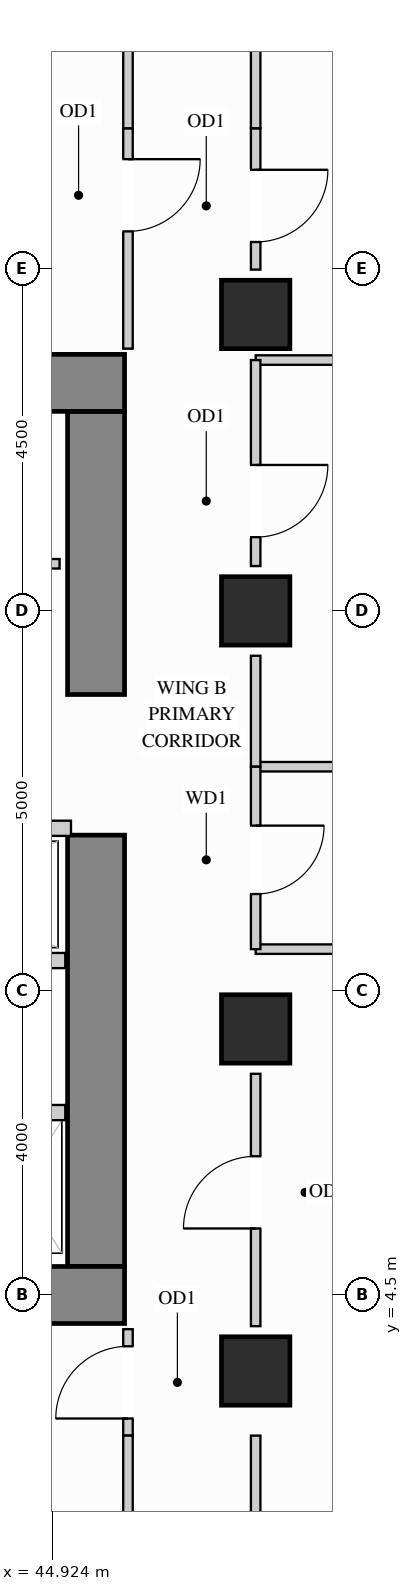
"""IFC4 building model, lengths in metres.
Left out: names, types, materials, properties, quantities, classifications, styles, units other than length and angle.
Written with IfcOpenShell. Run it as: python <this file> out.ifc"""

import sys

from ifc_helpers import new_model, si_unit, direction, frame, frame_2d, origin, origin_2d, place, context, subcontext, project, spatial, rectangle, extrude, source, transform, mapped, element, fill, save


model = new_model("IFC4")
c1 = context("Model", 3, precision=1e-05, world=origin(), true_north=direction((0.0, 1.0)))
c2 = subcontext(c1, "Body", "Model", "MODEL_VIEW")
j1 = project(units=[si_unit("LENGTHUNIT", "METRE"), si_unit("PLANEANGLEUNIT", "RADIAN")], contexts=[c1])
p1 = place(None, origin())
s1 = spatial("IfcSite", under=j1, at=p1, CompositionType="ELEMENT")
p2 = place(p1, origin())
s2 = spatial("IfcBuilding", under=s1, at=p2, CompositionType="ELEMENT")
p3 = place(p2, frame((0.0, 0.0, 99.0)))
s3 = spatial("IfcBuildingStorey", under=s2, at=p3, CompositionType="ELEMENT", Elevation=99.0)
m1 = source(origin(), c2, "Body", "SweptSolid", [
    extrude(rectangle(XDim=0.9, YDim=0.9, at=origin_2d()), origin(), (0.0, 0.0, 1.0), 3.38),
])
for number, where, z_axis, x_axis in (
    (1, (47.6, 13.5, 0.0), (0.0, 0.0, 1.0), (1.0, 0.0, 0.0)),
    (2, (47.6, 3.5, 0.0), (0.0, 0.0, 1.0), (1.0, 0.0, 0.0)),
    (3, (47.6, 8.0, 0.0), (0.0, 0.0, 1.0), (1.0, 0.0, 0.0)),
    (4, (47.6, 17.4, 0.0), (0.0, 0.0, 1.0), (1.0, 0.0, 0.0)),
):
    element("IfcColumn", number, at=place(p3, frame(where, z_axis=z_axis, x_axis=x_axis)), inside=s3, PredefinedType="COLUMN", context=c2, shape_type="MappedRepresentation", body=[
        mapped(m1, transform((0.0, 0.0, 0.0), x_axis=(1.0, 0.0, 0.0), y_axis=(0.0, 1.0, 0.0), z_axis=(0.0, 0.0, 1.0))),
    ])
m2 = source(origin(), c2, "Body", "SweptSolid", [
    extrude(rectangle(XDim=5.675, YDim=0.75, at=frame_2d((2.837, 0.0))), origin(), (0.0, 0.0, 1.0), 3.38),
])
p4 = place(p3, frame((45.5, 4.875, 0.0), z_axis=(0.0, 0.0, 1.0), x_axis=(0.0, 1.0, 0.0)))
e5 = element("IfcWall", 5, at=p4, inside=s3, PredefinedType="SHEAR", context=c2, shape_type="MappedRepresentation", body=[
    mapped(m2, transform((0.0, 0.0, 0.0), x_axis=(1.0, 0.0, 0.0), y_axis=(0.0, 1.0, 0.0), z_axis=(0.0, 0.0, 1.0))),
])
m3 = source(origin(), c2, "Body", "SweptSolid", [
    extrude(rectangle(XDim=3.725, YDim=0.75, at=frame_2d((1.863, 0.0))), origin(), (0.0, 0.0, 1.0), 3.38),
])
p5 = place(p3, frame((45.5, 12.4, 0.0), z_axis=(0.0, 0.0, 1.0), x_axis=(0.0, 1.0, 0.0)))
e6 = element("IfcWall", 6, at=p5, inside=s3, PredefinedType="SHEAR", context=c2, shape_type="MappedRepresentation", body=[
    mapped(m3, transform((0.0, 0.0, 0.0), x_axis=(1.0, 0.0, 0.0), y_axis=(0.0, 1.0, 0.0), z_axis=(0.0, 0.0, 1.0))),
])
m4 = source(origin(), c2, "Body", "SweptSolid", [
    extrude(rectangle(XDim=10.25, YDim=0.75, at=frame_2d((5.125, 0.0))), origin(), (0.0, 0.0, 1.0), 3.38),
])
for number, where, z_axis, x_axis in (
    (7, (35.625, 16.5, 0.0), (0.0, 0.0, 1.0), (1.0, 0.0, 0.0)),
    (8, (35.625, 4.5, 0.0), (0.0, 0.0, 1.0), (1.0, 0.0, 0.0)),
):
    element("IfcWall", number, at=place(p3, frame(where, z_axis=z_axis, x_axis=x_axis)), inside=s3, PredefinedType="SHEAR", context=c2, shape_type="MappedRepresentation", body=[
        mapped(m4, transform((0.0, 0.0, 0.0), x_axis=(1.0, 0.0, 0.0), y_axis=(0.0, 1.0, 0.0), z_axis=(0.0, 0.0, 1.0))),
    ])
p6 = place(p3, frame((41.8, 14.12, 0.0), z_axis=(0.0, 0.0, 1.0), x_axis=(1.0, 0.0, 0.0)))
e9 = element("IfcWall", 9, at=p6, inside=s3, PredefinedType="PARTITIONING", context=c2, shape_type="SweptSolid", body=[
    extrude(rectangle(XDim=3.22, YDim=0.125, at=frame_2d((1.61, 0.0))), origin(), (0.0, 0.0, 1.0), 3.365),
])
p7 = place(p6, frame((1.135, 0.0, 0.0)))
e10 = element("IfcOpeningElement", 10, at=p7, cuts=e9, PredefinedType="OPENING", context=c2, shape_type="SweptSolid", body=[
    extrude(rectangle(XDim=0.85, YDim=2.1, at=frame_2d((0.425, 1.05))), frame((0.0, 0.073, 0.0), z_axis=(0.0, -1.0, 0.0), x_axis=(1.0, 0.0, 0.0)), (0.0, 0.0, 1.0), 0.145),
])
m5 = source(origin(), c2, "Body", "SweptSolid", [
    extrude(rectangle(XDim=8.048, YDim=0.125, at=frame_2d((4.024, 0.0))), origin(), (0.0, 0.0, 1.0), 3.365),
])
for number, where, z_axis, x_axis in (
    (11, (47.6, 11.45, 0.0), (0.0, 0.0, 1.0), (1.0, 0.0, 0.0)),
    (12, (47.6, 16.8, 0.0), (0.0, 0.0, 1.0), (1.0, 0.0, 0.0)),
    (13, (47.6, 9.05, 0.0), (0.0, 0.0, 1.0), (1.0, 0.0, 0.0)),
):
    element("IfcWall", number, at=place(p3, frame(where, z_axis=z_axis, x_axis=x_axis)), inside=s3, PredefinedType="PARTITIONING", context=c2, shape_type="MappedRepresentation", body=[
        mapped(m5, transform((0.0, 0.0, 0.0), x_axis=(1.0, 0.0, 0.0), y_axis=(0.0, 1.0, 0.0), z_axis=(0.0, 0.0, 1.0))),
    ])
p8 = place(p3, frame((47.6, 4.09, 0.0), z_axis=(0.0, 0.0, 1.0), x_axis=(0.0, 1.0, 0.0)))
e14 = element("IfcWall", 14, at=p8, inside=s3, PredefinedType="PARTITIONING", context=c2, shape_type="SweptSolid", body=[
    extrude(rectangle(XDim=3.32, YDim=0.125, at=frame_2d((1.66, 0.0))), origin(), (0.0, 0.0, 1.0), 2.677),
])
p9 = place(p8, frame((1.285, 0.0, 0.0)))
e15 = element("IfcOpeningElement", 15, at=p9, cuts=e14, PredefinedType="OPENING", context=c2, shape_type="SweptSolid", body=[
    extrude(rectangle(XDim=0.95, YDim=2.15, at=frame_2d((0.475, 1.075))), frame((0.0, 0.073, 0.0), z_axis=(0.0, -1.0, 0.0), x_axis=(1.0, 0.0, 0.0)), (0.0, 0.0, 1.0), 0.145),
])
m6 = source(origin(), c2, "Body", "SweptSolid", [
    extrude(rectangle(XDim=1.46, YDim=0.125, at=frame_2d((0.73, 0.0))), origin(), (0.0, 0.0, 1.0), 2.677),
])
for number, where, z_axis, x_axis in (
    (16, (47.6, 1.19, 0.0), (0.0, 0.0, 1.0), (0.0, 1.0, 0.0)),
    (17, (47.6, 11.45, 0.0), (0.0, 0.0, 1.0), (0.0, 1.0, 0.0)),
):
    element("IfcWall", number, at=place(p3, frame(where, z_axis=z_axis, x_axis=x_axis)), inside=s3, PredefinedType="PARTITIONING", context=c2, shape_type="MappedRepresentation", body=[
        mapped(m6, transform((0.0, 0.0, 0.0), x_axis=(1.0, 0.0, 0.0), y_axis=(0.0, 1.0, 0.0), z_axis=(0.0, 0.0, 1.0))),
    ])
p10 = place(p3, frame((47.6, 14.09, 0.0), z_axis=(0.0, 0.0, 1.0), x_axis=(0.0, 1.0, 0.0)))
e18 = element("IfcWall", 18, at=p10, inside=s3, PredefinedType="PARTITIONING", context=c2, shape_type="SweptSolid", body=[
    extrude(rectangle(XDim=2.71, YDim=0.125, at=frame_2d((1.355, 0.0))), origin(), (0.0, 0.0, 1.0), 2.677),
])
p11 = place(p10, frame((0.38, 0.0, 0.0)))
e19 = element("IfcOpeningElement", 19, at=p11, cuts=e18, PredefinedType="OPENING", context=c2, shape_type="SweptSolid", body=[
    extrude(rectangle(XDim=0.95, YDim=2.15, at=frame_2d((0.475, 1.075))), frame((0.0, 0.073, 0.0), z_axis=(0.0, -1.0, 0.0), x_axis=(1.0, 0.0, 0.0)), (0.0, 0.0, 1.0), 0.145),
])
p12 = place(p3, frame((47.6, 17.99, 0.0), z_axis=(0.0, 0.0, 1.0), x_axis=(0.0, 1.0, 0.0)))
e20 = element("IfcWall", 20, at=p12, inside=s3, PredefinedType="PARTITIONING", context=c2, shape_type="SweptSolid", body=[
    extrude(rectangle(XDim=1.86, YDim=0.125, at=frame_2d((0.93, 0.0))), origin(), (0.0, 0.0, 1.0), 2.677),
])
p13 = place(p12, frame((0.363, 0.0, 0.0)))
e21 = element("IfcOpeningElement", 21, at=p13, cuts=e20, PredefinedType="OPENING", context=c2, shape_type="SweptSolid", body=[
    extrude(rectangle(XDim=0.95, YDim=2.15, at=frame_2d((0.475, 1.075))), frame((0.0, 0.073, 0.0), z_axis=(0.0, -1.0, 0.0), x_axis=(1.0, 0.0, 0.0)), (0.0, 0.0, 1.0), 0.145),
])
p14 = place(p3, frame((47.6, 19.85, 0.0), z_axis=(0.0, 0.0, 1.0), x_axis=(0.0, 1.0, 0.0)))
e22 = element("IfcWall", 22, at=p14, inside=s3, PredefinedType="PARTITIONING", context=c2, shape_type="MappedRepresentation", body=[
    mapped(m6, transform((0.0, 0.0, 0.0), x_axis=(1.0, 0.0, 0.0), y_axis=(0.0, 1.0, 0.0), z_axis=(0.0, 0.0, 1.0))),
])
p15 = place(p3, frame((47.6, 9.05, 0.0), z_axis=(0.0, 0.0, 1.0), x_axis=(0.0, 1.0, 0.0)))
e23 = element("IfcWall", 23, at=p15, inside=s3, PredefinedType="PARTITIONING", context=c2, shape_type="SweptSolid", body=[
    extrude(rectangle(XDim=2.4, YDim=0.125, at=frame_2d((1.2, 0.0))), origin(), (0.0, 0.0, 1.0), 2.677),
])
p16 = place(p15, frame((0.725, 0.0, 0.0)))
e24 = element("IfcOpeningElement", 24, at=p16, cuts=e23, PredefinedType="OPENING", context=c2, shape_type="SweptSolid", body=[
    extrude(rectangle(XDim=0.9, YDim=2.15, at=frame_2d((0.45, 1.075))), frame((0.0, 0.073, 0.0), z_axis=(0.0, -1.0, 0.0), x_axis=(1.0, 0.0, 0.0)), (0.0, 0.0, 1.0), 0.145),
])
p17 = place(p3, frame((45.92, 16.95, 0.0), z_axis=(0.0, 0.0, 1.0), x_axis=(0.0, 1.0, 0.0)))
e25 = element("IfcWall", 25, at=p17, inside=s3, PredefinedType="PARTITIONING", context=c2, shape_type="SweptSolid", body=[
    extrude(rectangle(XDim=2.9, YDim=0.125, at=frame_2d((1.45, 0.0))), origin(), (0.0, 0.0, 1.0), 3.365),
])
p18 = place(p17, frame((1.543, 0.0, 0.0)))
e26 = element("IfcOpeningElement", 26, at=p18, cuts=e25, PredefinedType="OPENING", context=c2, shape_type="SweptSolid", body=[
    extrude(rectangle(XDim=0.95, YDim=2.15, at=frame_2d((0.475, 1.075))), frame((0.0, 0.073, 0.0), z_axis=(0.0, -1.0, 0.0), x_axis=(1.0, 0.0, 0.0)), (0.0, 0.0, 1.0), 0.145),
])
m7 = source(origin(), c2, "Body", "SweptSolid", [
    extrude(rectangle(XDim=2.298, YDim=0.125, at=frame_2d((1.149, 0.0))), origin(), (0.0, 0.0, 1.0), 3.365),
])
p19 = place(p3, frame((45.92, 19.85, 0.0), z_axis=(0.0, 0.0, 1.0), x_axis=(0.0, 1.0, 0.0)))
e27 = element("IfcWall", 27, at=p19, inside=s3, PredefinedType="PARTITIONING", context=c2, shape_type="MappedRepresentation", body=[
    mapped(m7, transform((0.0, 0.0, 0.0), x_axis=(1.0, 0.0, 0.0), y_axis=(0.0, 1.0, 0.0), z_axis=(0.0, 0.0, 1.0))),
])
p20 = place(p3, frame((45.92, 2.65, 0.0), z_axis=(0.0, 0.0, 1.0), x_axis=(0.0, 1.0, 0.0)))
e28 = element("IfcWall", 28, at=p20, inside=s3, PredefinedType="PARTITIONING", context=c2, shape_type="SweptSolid", body=[
    extrude(rectangle(XDim=1.4, YDim=0.125, at=frame_2d((0.7, 0.0))), origin(), (0.0, 0.0, 1.0), 3.365),
])
p21 = place(p20, frame((0.225, 0.0, 0.0)))
e29 = element("IfcOpeningElement", 29, at=p21, cuts=e28, PredefinedType="OPENING", context=c2, shape_type="SweptSolid", body=[
    extrude(rectangle(XDim=0.95, YDim=2.15, at=frame_2d((0.475, 1.075))), frame((0.0, 0.073, 0.0), z_axis=(0.0, -1.0, 0.0), x_axis=(1.0, 0.0, 0.0)), (0.0, 0.0, 1.0), 0.145),
])
p22 = place(p3, frame((45.92, 0.352, 0.0), z_axis=(0.0, 0.0, 1.0), x_axis=(0.0, 1.0, 0.0)))
e30 = element("IfcWall", 30, at=p22, inside=s3, PredefinedType="PARTITIONING", context=c2, shape_type="MappedRepresentation", body=[
    mapped(m7, transform((0.0, 0.0, 0.0), x_axis=(1.0, 0.0, 0.0), y_axis=(0.0, 1.0, 0.0), z_axis=(0.0, 0.0, 1.0))),
])
m8 = source(origin(), c2, "Body", "SweptSolid", [
    extrude(rectangle(XDim=1.245, YDim=0.2, at=frame_2d((0.623, 0.0))), origin(), (0.0, 0.0, 1.0), 3.365),
])
p23 = place(p3, frame((43.85, 6.9, 0.0), z_axis=(0.0, 0.0, 1.0), x_axis=(1.0, 0.0, 0.0)))
e31 = element("IfcWall", 31, at=p23, inside=s3, PredefinedType="PARTITIONING", context=c2, shape_type="MappedRepresentation", body=[
    mapped(m8, transform((0.0, 0.0, 0.0), x_axis=(1.0, 0.0, 0.0), y_axis=(0.0, 1.0, 0.0), z_axis=(0.0, 0.0, 1.0))),
])
m9 = source(origin(), c2, "Body", "SweptSolid", [
    extrude(rectangle(XDim=3.49, YDim=0.2, at=frame_2d((1.745, 0.0))), origin(), (0.0, 0.0, 1.0), 3.365),
])
p24 = place(p3, frame((41.68, 10.64, 0.0), z_axis=(0.0, 0.0, 1.0), x_axis=(1.0, 0.0, 0.0)))
e32 = element("IfcWall", 32, at=p24, inside=s3, PredefinedType="PARTITIONING", context=c2, shape_type="MappedRepresentation", body=[
    mapped(m9, transform((0.0, 0.0, 0.0), x_axis=(1.0, 0.0, 0.0), y_axis=(0.0, 1.0, 0.0), z_axis=(0.0, 0.0, 1.0))),
])
m10 = source(origin(), c2, "Body", "SweptSolid", [
    extrude(rectangle(XDim=3.415, YDim=0.2, at=frame_2d((1.708, 0.0))), origin(), (0.0, 0.0, 1.0), 3.365),
])
p25 = place(p3, frame((41.68, 8.9, 0.0), z_axis=(0.0, 0.0, 1.0), x_axis=(1.0, 0.0, 0.0)))
e33 = element("IfcWall", 33, at=p25, inside=s3, PredefinedType="PARTITIONING", context=c2, shape_type="MappedRepresentation", body=[
    mapped(m10, transform((0.0, 0.0, 0.0), x_axis=(1.0, 0.0, 0.0), y_axis=(0.0, 1.0, 0.0), z_axis=(0.0, 0.0, 1.0))),
])
m11 = source(origin(), c2, "Body", "SweptSolid", [
    extrude(rectangle(XDim=0.95, YDim=2.15, at=frame_2d((0.475, 1.075))), frame((0.0, 0.025, 0.0), z_axis=(0.0, -1.0, 0.0), x_axis=(1.0, 0.0, 0.0)), (0.0, 0.0, 1.0), 0.05),
])
p26 = place(p18, origin())
e34 = element("IfcDoor", 34, at=p26, inside=s3, OperationType="SINGLE_SWING_RIGHT", PredefinedType="DOOR", context=c2, shape_type="MappedRepresentation", body=[
    mapped(m11, transform((0.0, 0.0, 0.0), x_axis=(1.0, 0.0, 0.0), y_axis=(0.0, 1.0, 0.0), z_axis=(0.0, 0.0, 1.0))),
])
fill(e26, e34)
p27 = place(p21, origin())
e35 = element("IfcDoor", 35, at=p27, inside=s3, OperationType="SINGLE_SWING_LEFT", PredefinedType="DOOR", context=c2, shape_type="MappedRepresentation", body=[
    mapped(m11, transform((0.0, 0.0, 0.0), x_axis=(1.0, 0.0, 0.0), y_axis=(0.0, 1.0, 0.0), z_axis=(0.0, 0.0, 1.0))),
])
fill(e29, e35)
p28 = place(p9, origin())
e36 = element("IfcDoor", 36, at=p28, inside=s3, OperationType="SINGLE_SWING_LEFT", PredefinedType="DOOR", context=c2, shape_type="MappedRepresentation", body=[
    mapped(m11, transform((0.0, 0.0, 0.0), x_axis=(1.0, 0.0, 0.0), y_axis=(0.0, 1.0, 0.0), z_axis=(0.0, 0.0, 1.0))),
])
fill(e15, e36)
p29 = place(p11, origin())
e37 = element("IfcDoor", 37, at=p29, inside=s3, OperationType="SINGLE_SWING_RIGHT", PredefinedType="DOOR", context=c2, shape_type="MappedRepresentation", body=[
    mapped(m11, transform((0.0, 0.0, 0.0), x_axis=(1.0, 0.0, 0.0), y_axis=(0.0, 1.0, 0.0), z_axis=(0.0, 0.0, 1.0))),
])
fill(e19, e37)
p30 = place(p13, origin())
e38 = element("IfcDoor", 38, at=p30, inside=s3, OperationType="SINGLE_SWING_RIGHT", PredefinedType="DOOR", context=c2, shape_type="MappedRepresentation", body=[
    mapped(m11, transform((0.0, 0.0, 0.0), x_axis=(1.0, 0.0, 0.0), y_axis=(0.0, 1.0, 0.0), z_axis=(0.0, 0.0, 1.0))),
])
fill(e21, e38)
m12 = source(origin(), c2, "Body", "SweptSolid", [
    extrude(rectangle(XDim=0.9, YDim=2.15, at=frame_2d((0.45, 1.075))), frame((0.0, 0.025, 0.0), z_axis=(0.0, -1.0, 0.0), x_axis=(1.0, 0.0, 0.0)), (0.0, 0.0, 1.0), 0.05),
])
p31 = place(p16, origin())
e39 = element("IfcDoor", 39, at=p31, inside=s3, OperationType="SINGLE_SWING_RIGHT", PredefinedType="DOOR", context=c2, shape_type="MappedRepresentation", body=[
    mapped(m12, transform((0.0, 0.0, 0.0), x_axis=(1.0, 0.0, 0.0), y_axis=(0.0, 1.0, 0.0), z_axis=(0.0, 0.0, 1.0))),
])
fill(e24, e39)
save(model, sys.argv[1])
